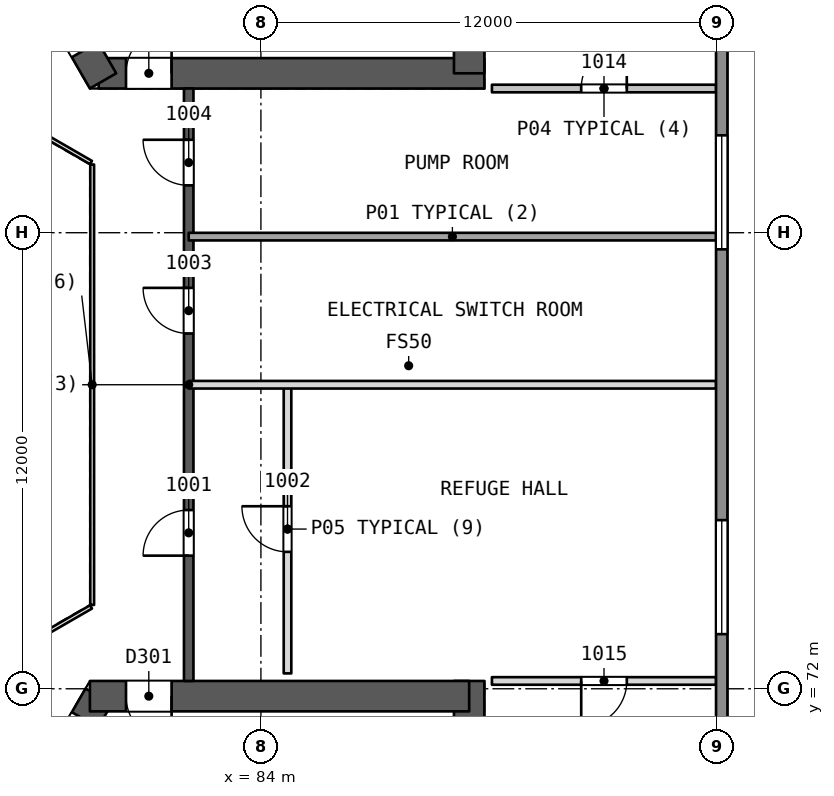
"""IFC4 building model, lengths in metres.
Left out: names, types, materials, properties, quantities, classifications, styles, units other than length and angle.
Written with IfcOpenShell. Run it as: python <this file> out.ifc"""

import sys

from ifc_helpers import new_model, si_unit, direction, frame, frame_2d, origin, place, context, subcontext, project, spatial, rectangle, extrude, element, fill, save


model = new_model("IFC4")
c1 = context("Model", 3, precision=1e-05, world=origin(), true_north=direction((0.0, 1.0)))
c2 = subcontext(c1, "Body", "Model", "MODEL_VIEW")
j1 = project(units=[si_unit("LENGTHUNIT", "METRE"), si_unit("PLANEANGLEUNIT", "RADIAN")], contexts=[c1])
p1 = place(None, origin())
s1 = spatial("IfcSite", under=j1, at=p1, CompositionType="ELEMENT")
p2 = place(p1, origin())
s2 = spatial("IfcBuilding", under=s1, at=p2, CompositionType="ELEMENT")
p3 = place(p2, frame((0.0, 0.0, 48.5)))
s3 = spatial("IfcBuildingStorey", under=s2, at=p3, CompositionType="ELEMENT", Elevation=48.5)
p4 = place(p3, frame((79.731, 88.194, 0.0), z_axis=(0.0, 0.0, 1.0), x_axis=(1.0, 0.0, 0.0)))
e1 = element("IfcWall", 1, at=p4, inside=s3, PredefinedType="SHEAR", context=c2, shape_type="SweptSolid", body=[
    extrude(rectangle(XDim=10.149, YDim=0.8, at=frame_2d((5.074, 0.0))), origin(), (0.0, 0.0, 1.0), 4.4),
])
p5 = place(p4, frame((0.719, 0.0, 0.0)))
e2 = element("IfcOpeningElement", 2, at=p5, cuts=e1, PredefinedType="OPENING", context=c2, shape_type="SweptSolid", body=[
    extrude(rectangle(XDim=1.2, YDim=2.1, at=frame_2d((0.6, 1.05))), frame((0.0, 0.411, 0.0), z_axis=(0.0, -1.0, 0.0), x_axis=(1.0, 0.0, 0.0)), (0.0, 0.0, 1.0), 0.821),
])
p6 = place(p3, frame((89.48, 88.194, 0.0), z_axis=(0.0, 0.0, 1.0), x_axis=(0.0, 1.0, 0.0)))
e3 = element("IfcWall", 3, at=p6, inside=s3, PredefinedType="SHEAR", context=c2, shape_type="SweptSolid", body=[
    extrude(rectangle(XDim=13.933, YDim=0.8, at=frame_2d((6.967, 0.0))), origin(), (0.0, 0.0, 1.0), 4.4),
])
p7 = place(p3, frame((74.856, 96.637, 0.0), z_axis=(0.0, 0.0, 1.0), x_axis=(0.499993500917, -0.866029155999, 0.0)))
e4 = element("IfcWall", 4, at=p7, inside=s3, PredefinedType="SHEAR", context=c2, shape_type="SweptSolid", body=[
    extrude(rectangle(XDim=9.98, YDim=0.8, at=frame_2d((4.99, 0.0))), origin(), (0.0, 0.0, 1.0), 4.4),
])
p8 = place(p7, frame((7.83, 0.0, 0.0)))
e5 = element("IfcOpeningElement", 5, at=p8, cuts=e4, PredefinedType="OPENING", context=c2, shape_type="SweptSolid", body=[
    extrude(rectangle(XDim=1.2, YDim=2.1, at=frame_2d((0.6, 1.05))), frame((0.0, 0.411, 0.0), z_axis=(0.0, -1.0, 0.0), x_axis=(1.0, 0.0, 0.0)), (0.0, 0.0, 1.0), 0.821),
])
p9 = place(p3, frame((79.731, 71.806, 0.0), z_axis=(0.0, 0.0, 1.0), x_axis=(-0.49999662545, -0.866027352073, 0.0)))
e6 = element("IfcWall", 6, at=p9, inside=s3, PredefinedType="SHEAR", context=c2, shape_type="SweptSolid", body=[
    extrude(rectangle(XDim=10.149, YDim=0.8, at=frame_2d((5.074, 0.0))), origin(), (0.0, 0.0, 1.0), 4.4),
])
p10 = place(p9, frame((0.719, 0.0, 0.0)))
e7 = element("IfcOpeningElement", 7, at=p10, cuts=e6, PredefinedType="OPENING", context=c2, shape_type="SweptSolid", body=[
    extrude(rectangle(XDim=1.2, YDim=2.1, at=frame_2d((0.6, 1.05))), frame((0.0, 0.411, 0.0), z_axis=(0.0, -1.0, 0.0), x_axis=(1.0, 0.0, 0.0)), (0.0, 0.0, 1.0), 0.821),
])
p11 = place(p3, frame((89.48, 58.103, 0.0), z_axis=(0.0, 0.0, 1.0), x_axis=(0.0, 1.0, 0.0)))
e8 = element("IfcWall", 8, at=p11, inside=s3, PredefinedType="SHEAR", context=c2, shape_type="SweptSolid", body=[
    extrude(rectangle(XDim=14.103, YDim=0.8, at=frame_2d((7.051, 0.0))), origin(), (0.0, 0.0, 1.0), 4.4),
])
p12 = place(p3, frame((89.48, 71.806, 0.0), z_axis=(0.0, 0.0, 1.0), x_axis=(-1.0, 0.0, 0.0)))
e9 = element("IfcWall", 9, at=p12, inside=s3, PredefinedType="SHEAR", context=c2, shape_type="SweptSolid", body=[
    extrude(rectangle(XDim=9.98, YDim=0.8, at=frame_2d((4.99, 0.0))), origin(), (0.0, 0.0, 1.0), 4.4),
])
p13 = place(p12, frame((7.83, 0.0, 0.0)))
e10 = element("IfcOpeningElement", 10, at=p13, cuts=e9, PredefinedType="OPENING", context=c2, shape_type="SweptSolid", body=[
    extrude(rectangle(XDim=1.2, YDim=2.1, at=frame_2d((0.6, 1.05))), frame((0.0, 0.411, 0.0), z_axis=(0.0, -1.0, 0.0), x_axis=(1.0, 0.0, 0.0)), (0.0, 0.0, 1.0), 0.821),
])
p14 = place(p3, frame((82.1, 72.206, 0.0), z_axis=(0.0, 0.0, 1.0), x_axis=(0.0, 1.0, 0.0)))
e11 = element("IfcWall", 11, at=p14, inside=s3, PredefinedType="SHEAR", context=c2, shape_type="SweptSolid", body=[
    extrude(rectangle(XDim=15.588, YDim=0.25, at=frame_2d((7.794, 0.0))), origin(), (0.0, 0.0, 1.0), 3.9),
])
p15 = place(p14, frame((3.297, 0.0, 0.0)))
e12 = element("IfcOpeningElement", 12, at=p15, cuts=e11, PredefinedType="OPENING", context=c2, shape_type="SweptSolid", body=[
    extrude(rectangle(XDim=1.2, YDim=2.4, at=frame_2d((0.6, 1.2))), frame((0.0, 0.135, 0.0), z_axis=(0.0, -1.0, 0.0), x_axis=(1.0, 0.0, 0.0)), (0.0, 0.0, 1.0), 0.271),
])
p16 = place(p14, frame((9.143, 0.0, 0.0)))
e13 = element("IfcOpeningElement", 13, at=p16, cuts=e11, PredefinedType="OPENING", context=c2, shape_type="SweptSolid", body=[
    extrude(rectangle(XDim=1.2, YDim=2.4, at=frame_2d((0.6, 1.2))), frame((0.0, 0.135, 0.0), z_axis=(0.0, -1.0, 0.0), x_axis=(1.0, 0.0, 0.0)), (0.0, 0.0, 1.0), 0.271),
])
p17 = place(p14, frame((13.04, 0.0, 0.0)))
e14 = element("IfcOpeningElement", 14, at=p17, cuts=e11, PredefinedType="OPENING", context=c2, shape_type="SweptSolid", body=[
    extrude(rectangle(XDim=1.2, YDim=2.4, at=frame_2d((0.6, 1.2))), frame((0.0, 0.135, 0.0), z_axis=(0.0, -1.0, 0.0), x_axis=(1.0, 0.0, 0.0)), (0.0, 0.0, 1.0), 0.271),
])
p18 = place(p3, frame((84.7, 72.405, 0.0), z_axis=(0.0, 0.0, 1.0), x_axis=(0.0, 1.0, 0.0)))
e15 = element("IfcWall", 15, at=p18, inside=s3, PredefinedType="PARTITIONING", context=c2, shape_type="SweptSolid", body=[
    extrude(rectangle(XDim=7.595, YDim=0.2, at=frame_2d((3.798, 0.0))), origin(), (0.0, 0.0, 1.0), 3.9),
])
p19 = place(p18, frame((3.198, 0.0, 0.0)))
e16 = element("IfcOpeningElement", 16, at=p19, cuts=e15, PredefinedType="OPENING", context=c2, shape_type="SweptSolid", body=[
    extrude(rectangle(XDim=1.2, YDim=2.4, at=frame_2d((0.6, 1.2))), frame((0.0, 0.11, 0.0), z_axis=(0.0, -1.0, 0.0), x_axis=(1.0, 0.0, 0.0)), (0.0, 0.0, 1.0), 0.221),
])
p20 = place(p3, frame((95.978, 80.0, 0.0), z_axis=(0.0, 0.0, 1.0), x_axis=(-1.0, 0.0, 0.0)))
e17 = element("IfcWall", 17, at=p20, inside=s3, PredefinedType="PARTITIONING", context=c2, shape_type="SweptSolid", body=[
    extrude(rectangle(XDim=13.877, YDim=0.2, at=frame_2d((6.939, 0.0))), origin(), (0.0, 0.0, 1.0), 3.9),
])
p21 = place(p3, frame((95.978, 72.206, 0.0), z_axis=(0.0, 0.0, 1.0), x_axis=(-1.0, 0.0, 0.0)))
e18 = element("IfcWall", 18, at=p21, inside=s3, PredefinedType="PARTITIONING", context=c2, shape_type="SweptSolid", body=[
    extrude(rectangle(XDim=5.898, YDim=0.2, at=frame_2d((2.949, 0.0))), origin(), (0.0, 0.0, 1.0), 3.9),
])
p22 = place(p21, frame((2.349, 0.0, 0.0)))
e19 = element("IfcOpeningElement", 19, at=p22, cuts=e18, PredefinedType="OPENING", context=c2, shape_type="SweptSolid", body=[
    extrude(rectangle(XDim=1.2, YDim=2.4, at=frame_2d((0.6, 1.2))), frame((0.0, 0.11, 0.0), z_axis=(0.0, -1.0, 0.0), x_axis=(1.0, 0.0, 0.0)), (0.0, 0.0, 1.0), 0.221),
])
p23 = place(p3, frame((95.978, 83.897, 0.0), z_axis=(0.0, 0.0, 1.0), x_axis=(-1.0, 0.0, 0.0)))
e20 = element("IfcWall", 20, at=p23, inside=s3, PredefinedType="PARTITIONING", context=c2, shape_type="SweptSolid", body=[
    extrude(rectangle(XDim=13.877, YDim=0.2, at=frame_2d((6.939, 0.0))), origin(), (0.0, 0.0, 1.0), 3.9),
])
p24 = place(p3, frame((90.079, 87.794, 0.0), z_axis=(0.0, 0.0, 1.0), x_axis=(1.0, 0.0, 0.0)))
e21 = element("IfcWall", 21, at=p24, inside=s3, PredefinedType="PARTITIONING", context=c2, shape_type="SweptSolid", body=[
    extrude(rectangle(XDim=5.898, YDim=0.2, at=frame_2d((2.949, 0.0))), origin(), (0.0, 0.0, 1.0), 3.9),
])
p25 = place(p24, frame((2.349, 0.0, 0.0)))
e22 = element("IfcOpeningElement", 22, at=p25, cuts=e21, PredefinedType="OPENING", context=c2, shape_type="SweptSolid", body=[
    extrude(rectangle(XDim=1.2, YDim=2.4, at=frame_2d((0.6, 1.2))), frame((0.0, 0.11, 0.0), z_axis=(0.0, -1.0, 0.0), x_axis=(1.0, 0.0, 0.0)), (0.0, 0.0, 1.0), 0.221),
])
p26 = place(p3, frame((96.126, 110.375, 0.0), z_axis=(0.0, 0.0, 1.0), x_axis=(0.0, -1.0, 0.0)))
e23 = element("IfcWall", 23, at=p26, inside=s3, PredefinedType="SOLIDWALL", context=c2, shape_type="SweptSolid", body=[
    extrude(rectangle(XDim=60.751, YDim=0.3, at=frame_2d((30.375, 0.0))), origin(), (0.0, 0.0, 1.0), 3.9),
])
p27 = place(p26, frame((3.562, 0.0, 0.6)))
e24 = element("IfcOpeningElement", 24, at=p27, cuts=e23, PredefinedType="OPENING", context=c2, shape_type="SweptSolid", body=[
    extrude(rectangle(XDim=3.0, YDim=2.4, at=frame_2d((1.5, 1.2))), frame((0.0, 0.161, 0.0), z_axis=(0.0, -1.0, 0.0), x_axis=(1.0, 0.0, 0.0)), (0.0, 0.0, 1.0), 0.321),
])
p28 = place(p26, frame((13.688, 0.0, 0.6)))
e25 = element("IfcOpeningElement", 25, at=p28, cuts=e23, PredefinedType="OPENING", context=c2, shape_type="SweptSolid", body=[
    extrude(rectangle(XDim=3.0, YDim=2.4, at=frame_2d((1.5, 1.2))), frame((0.0, 0.161, 0.0), z_axis=(0.0, -1.0, 0.0), x_axis=(1.0, 0.0, 0.0)), (0.0, 0.0, 1.0), 0.321),
])
p29 = place(p26, frame((23.813, 0.0, 0.6)))
e26 = element("IfcOpeningElement", 26, at=p29, cuts=e23, PredefinedType="OPENING", context=c2, shape_type="SweptSolid", body=[
    extrude(rectangle(XDim=3.0, YDim=2.4, at=frame_2d((1.5, 1.2))), frame((0.0, 0.161, 0.0), z_axis=(0.0, -1.0, 0.0), x_axis=(1.0, 0.0, 0.0)), (0.0, 0.0, 1.0), 0.321),
])
p30 = place(p26, frame((33.938, 0.0, 0.6)))
e27 = element("IfcOpeningElement", 27, at=p30, cuts=e23, PredefinedType="OPENING", context=c2, shape_type="SweptSolid", body=[
    extrude(rectangle(XDim=3.0, YDim=2.4, at=frame_2d((1.5, 1.2))), frame((0.0, 0.161, 0.0), z_axis=(0.0, -1.0, 0.0), x_axis=(1.0, 0.0, 0.0)), (0.0, 0.0, 1.0), 0.321),
])
p31 = place(p26, frame((44.063, 0.0, 0.6)))
e28 = element("IfcOpeningElement", 28, at=p31, cuts=e23, PredefinedType="OPENING", context=c2, shape_type="SweptSolid", body=[
    extrude(rectangle(XDim=3.0, YDim=2.4, at=frame_2d((1.5, 1.2))), frame((0.0, 0.161, 0.0), z_axis=(0.0, -1.0, 0.0), x_axis=(1.0, 0.0, 0.0)), (0.0, 0.0, 1.0), 0.321),
])
p32 = place(p26, frame((54.188, 0.0, 0.6)))
e29 = element("IfcOpeningElement", 29, at=p32, cuts=e23, PredefinedType="OPENING", context=c2, shape_type="SweptSolid", body=[
    extrude(rectangle(XDim=3.0, YDim=2.4, at=frame_2d((1.5, 1.2))), frame((0.0, 0.161, 0.0), z_axis=(0.0, -1.0, 0.0), x_axis=(1.0, 0.0, 0.0)), (0.0, 0.0, 1.0), 0.321),
])
p33 = place(p3, frame((38.131, 83.108, 0.0), z_axis=(0.0, 0.0, 1.0), x_axis=(0.866025105017, 0.50000051748, 0.0)))
e30 = element("IfcWall", 30, at=p33, inside=s3, PredefinedType="SOLIDWALL", context=c2, shape_type="SweptSolid", body=[
    extrude(rectangle(XDim=60.751, YDim=0.3, at=frame_2d((30.375, 0.0))), origin(), (0.0, 0.0, 1.0), 3.9),
])
p34 = place(p33, frame((3.562, 0.0, 0.6)))
e31 = element("IfcOpeningElement", 31, at=p34, cuts=e30, PredefinedType="OPENING", context=c2, shape_type="SweptSolid", body=[
    extrude(rectangle(XDim=3.0, YDim=2.4, at=frame_2d((1.5, 1.2))), frame((0.0, 0.161, 0.0), z_axis=(0.0, -1.0, 0.0), x_axis=(1.0, 0.0, 0.0)), (0.0, 0.0, 1.0), 0.321),
])
p35 = place(p33, frame((13.688, 0.0, 0.6)))
e32 = element("IfcOpeningElement", 32, at=p35, cuts=e30, PredefinedType="OPENING", context=c2, shape_type="SweptSolid", body=[
    extrude(rectangle(XDim=3.0, YDim=2.4, at=frame_2d((1.5, 1.2))), frame((0.0, 0.161, 0.0), z_axis=(0.0, -1.0, 0.0), x_axis=(1.0, 0.0, 0.0)), (0.0, 0.0, 1.0), 0.321),
])
p36 = place(p33, frame((23.813, 0.0, 0.6)))
e33 = element("IfcOpeningElement", 33, at=p36, cuts=e30, PredefinedType="OPENING", context=c2, shape_type="SweptSolid", body=[
    extrude(rectangle(XDim=3.0, YDim=2.4, at=frame_2d((1.5, 1.2))), frame((0.0, 0.161, 0.0), z_axis=(0.0, -1.0, 0.0), x_axis=(1.0, 0.0, 0.0)), (0.0, 0.0, 1.0), 0.321),
])
p37 = place(p33, frame((33.938, 0.0, 0.6)))
e34 = element("IfcOpeningElement", 34, at=p37, cuts=e30, PredefinedType="OPENING", context=c2, shape_type="SweptSolid", body=[
    extrude(rectangle(XDim=3.0, YDim=2.4, at=frame_2d((1.5, 1.2))), frame((0.0, 0.161, 0.0), z_axis=(0.0, -1.0, 0.0), x_axis=(1.0, 0.0, 0.0)), (0.0, 0.0, 1.0), 0.321),
])
p38 = place(p33, frame((44.063, 0.0, 0.6)))
e35 = element("IfcOpeningElement", 35, at=p38, cuts=e30, PredefinedType="OPENING", context=c2, shape_type="SweptSolid", body=[
    extrude(rectangle(XDim=3.0, YDim=2.4, at=frame_2d((1.5, 1.2))), frame((0.0, 0.161, 0.0), z_axis=(0.0, -1.0, 0.0), x_axis=(1.0, 0.0, 0.0)), (0.0, 0.0, 1.0), 0.321),
])
p39 = place(p33, frame((54.188, 0.0, 0.6)))
e36 = element("IfcOpeningElement", 36, at=p39, cuts=e30, PredefinedType="OPENING", context=c2, shape_type="SweptSolid", body=[
    extrude(rectangle(XDim=3.0, YDim=2.4, at=frame_2d((1.5, 1.2))), frame((0.0, 0.161, 0.0), z_axis=(0.0, -1.0, 0.0), x_axis=(1.0, 0.0, 0.0)), (0.0, 0.0, 1.0), 0.321),
])
p40 = place(p3, frame((90.743, 46.516, 0.0), z_axis=(0.0, 0.0, 1.0), x_axis=(-0.866025105017, 0.50000051748, 0.0)))
e37 = element("IfcWall", 37, at=p40, inside=s3, PredefinedType="SOLIDWALL", context=c2, shape_type="SweptSolid", body=[
    extrude(rectangle(XDim=60.751, YDim=0.3, at=frame_2d((30.375, 0.0))), origin(), (0.0, 0.0, 1.0), 3.9),
])
p41 = place(p40, frame((3.562, 0.0, 0.6)))
e38 = element("IfcOpeningElement", 38, at=p41, cuts=e37, PredefinedType="OPENING", context=c2, shape_type="SweptSolid", body=[
    extrude(rectangle(XDim=3.0, YDim=2.4, at=frame_2d((1.5, 1.2))), frame((0.0, 0.161, 0.0), z_axis=(0.0, -1.0, 0.0), x_axis=(1.0, 0.0, 0.0)), (0.0, 0.0, 1.0), 0.321),
])
p42 = place(p40, frame((13.688, 0.0, 0.6)))
e39 = element("IfcOpeningElement", 39, at=p42, cuts=e37, PredefinedType="OPENING", context=c2, shape_type="SweptSolid", body=[
    extrude(rectangle(XDim=3.0, YDim=2.4, at=frame_2d((1.5, 1.2))), frame((0.0, 0.161, 0.0), z_axis=(0.0, -1.0, 0.0), x_axis=(1.0, 0.0, 0.0)), (0.0, 0.0, 1.0), 0.321),
])
p43 = place(p40, frame((23.813, 0.0, 0.6)))
e40 = element("IfcOpeningElement", 40, at=p43, cuts=e37, PredefinedType="OPENING", context=c2, shape_type="SweptSolid", body=[
    extrude(rectangle(XDim=3.0, YDim=2.4, at=frame_2d((1.5, 1.2))), frame((0.0, 0.161, 0.0), z_axis=(0.0, -1.0, 0.0), x_axis=(1.0, 0.0, 0.0)), (0.0, 0.0, 1.0), 0.321),
])
p44 = place(p40, frame((33.938, 0.0, 0.6)))
e41 = element("IfcOpeningElement", 41, at=p44, cuts=e37, PredefinedType="OPENING", context=c2, shape_type="SweptSolid", body=[
    extrude(rectangle(XDim=3.0, YDim=2.4, at=frame_2d((1.5, 1.2))), frame((0.0, 0.161, 0.0), z_axis=(0.0, -1.0, 0.0), x_axis=(1.0, 0.0, 0.0)), (0.0, 0.0, 1.0), 0.321),
])
p45 = place(p40, frame((44.063, 0.0, 0.6)))
e42 = element("IfcOpeningElement", 42, at=p45, cuts=e37, PredefinedType="OPENING", context=c2, shape_type="SweptSolid", body=[
    extrude(rectangle(XDim=3.0, YDim=2.4, at=frame_2d((1.5, 1.2))), frame((0.0, 0.161, 0.0), z_axis=(0.0, -1.0, 0.0), x_axis=(1.0, 0.0, 0.0)), (0.0, 0.0, 1.0), 0.321),
])
p46 = place(p40, frame((54.188, 0.0, 0.6)))
e43 = element("IfcOpeningElement", 43, at=p46, cuts=e37, PredefinedType="OPENING", context=c2, shape_type="SweptSolid", body=[
    extrude(rectangle(XDim=3.0, YDim=2.4, at=frame_2d((1.5, 1.2))), frame((0.0, 0.161, 0.0), z_axis=(0.0, -1.0, 0.0), x_axis=(1.0, 0.0, 0.0)), (0.0, 0.0, 1.0), 0.321),
])
p47 = place(p3, frame((79.56, 74.206, 0.0), z_axis=(0.0, 0.0, 1.0), x_axis=(0.0, 1.0, 0.0)))
e44 = element("IfcWall", 44, at=p47, inside=s3, PredefinedType="PARTITIONING", context=c2, shape_type="SweptSolid", body=[
    extrude(rectangle(XDim=11.588, YDim=0.1, at=frame_2d((5.794, 0.0))), origin(), (0.0, 0.0, 1.0), 3.9),
])
for number, where, z_axis, x_axis in (
    (45, (79.53, 85.846, 0.0), (0.0, 0.0, 1.0), (-0.866, 0.5, 0.0)),
    (46, (77.798, 73.154, 0.0), (0.0, 0.0, 1.0), (0.866, 0.5, 0.0)),
):
    element("IfcWall", number, at=place(p3, frame(where, z_axis=z_axis, x_axis=x_axis)), inside=s3, PredefinedType="PARTITIONING", context=c2, shape_type="SweptSolid", body=[
        extrude(rectangle(XDim=2.0, YDim=0.1, at=frame_2d((1.0, 0.0))), origin(), (0.0, 0.0, 1.0), 3.9),
    ])
p48 = place(p15, origin())
e47 = element("IfcDoor", 47, at=p48, inside=s3, OperationType="SINGLE_SWING_LEFT", PredefinedType="NOTDEFINED", context=c2, shape_type="SweptSolid", body=[
    extrude(rectangle(XDim=1.2, YDim=2.4, at=frame_2d((0.6, 1.2))), frame((0.0, 0.025, 0.0), z_axis=(0.0, -1.0, 0.0), x_axis=(1.0, 0.0, 0.0)), (0.0, 0.0, 1.0), 0.05),
])
fill(e12, e47)
p49 = place(p19, origin())
e48 = element("IfcDoor", 48, at=p49, inside=s3, OperationType="SINGLE_SWING_RIGHT", PredefinedType="NOTDEFINED", context=c2, shape_type="SweptSolid", body=[
    extrude(rectangle(XDim=1.2, YDim=2.4, at=frame_2d((0.6, 1.2))), frame((0.0, 0.025, 0.0), z_axis=(0.0, -1.0, 0.0), x_axis=(1.0, 0.0, 0.0)), (0.0, 0.0, 1.0), 0.05),
])
fill(e16, e48)
p50 = place(p16, origin())
e49 = element("IfcDoor", 49, at=p50, inside=s3, OperationType="SINGLE_SWING_RIGHT", PredefinedType="NOTDEFINED", context=c2, shape_type="SweptSolid", body=[
    extrude(rectangle(XDim=1.2, YDim=2.4, at=frame_2d((0.6, 1.2))), frame((0.0, 0.025, 0.0), z_axis=(0.0, -1.0, 0.0), x_axis=(1.0, 0.0, 0.0)), (0.0, 0.0, 1.0), 0.05),
])
fill(e13, e49)
p51 = place(p17, origin())
e50 = element("IfcDoor", 50, at=p51, inside=s3, OperationType="SINGLE_SWING_RIGHT", PredefinedType="NOTDEFINED", context=c2, shape_type="SweptSolid", body=[
    extrude(rectangle(XDim=1.2, YDim=2.4, at=frame_2d((0.6, 1.2))), frame((0.0, 0.025, 0.0), z_axis=(0.0, -1.0, 0.0), x_axis=(1.0, 0.0, 0.0)), (0.0, 0.0, 1.0), 0.05),
])
fill(e14, e50)
p52 = place(p25, origin())
e51 = element("IfcDoor", 51, at=p52, inside=s3, OperationType="SINGLE_SWING_RIGHT", PredefinedType="NOTDEFINED", context=c2, shape_type="SweptSolid", body=[
    extrude(rectangle(XDim=1.2, YDim=2.4, at=frame_2d((0.6, 1.2))), frame((0.0, 0.025, 0.0), z_axis=(0.0, -1.0, 0.0), x_axis=(1.0, 0.0, 0.0)), (0.0, 0.0, 1.0), 0.05),
])
fill(e22, e51)
p53 = place(p22, origin())
e52 = element("IfcDoor", 52, at=p53, inside=s3, OperationType="SINGLE_SWING_RIGHT", PredefinedType="NOTDEFINED", context=c2, shape_type="SweptSolid", body=[
    extrude(rectangle(XDim=1.2, YDim=2.4, at=frame_2d((0.6, 1.2))), frame((0.0, 0.025, 0.0), z_axis=(0.0, -1.0, 0.0), x_axis=(1.0, 0.0, 0.0)), (0.0, 0.0, 1.0), 0.05),
])
fill(e19, e52)
p54 = place(p29, origin())
e53 = element("IfcWindow", 53, at=p54, inside=s3, PartitioningType="SINGLE_PANEL", PredefinedType="WINDOW", context=c2, shape_type="SweptSolid", body=[
    extrude(rectangle(XDim=3.0, YDim=2.4, at=frame_2d((1.5, 1.2))), frame((0.0, 0.03, 0.0), z_axis=(0.0, -1.0, 0.0), x_axis=(1.0, 0.0, 0.0)), (0.0, 0.0, 1.0), 0.06),
])
fill(e26, e53)
p55 = place(p30, origin())
e54 = element("IfcWindow", 54, at=p55, inside=s3, PartitioningType="SINGLE_PANEL", PredefinedType="WINDOW", context=c2, shape_type="SweptSolid", body=[
    extrude(rectangle(XDim=3.0, YDim=2.4, at=frame_2d((1.5, 1.2))), frame((0.0, 0.03, 0.0), z_axis=(0.0, -1.0, 0.0), x_axis=(1.0, 0.0, 0.0)), (0.0, 0.0, 1.0), 0.06),
])
fill(e27, e54)
p56 = place(p5, origin())
e55 = element("IfcDoor", 55, at=p56, inside=s3, OperationType="SINGLE_SWING_RIGHT", PredefinedType="NOTDEFINED", context=c2, shape_type="SweptSolid", body=[
    extrude(rectangle(XDim=1.2, YDim=2.1, at=frame_2d((0.6, 1.05))), frame((0.0, 0.025, 0.0), z_axis=(0.0, -1.0, 0.0), x_axis=(1.0, 0.0, 0.0)), (0.0, 0.0, 1.0), 0.05),
])
fill(e2, e55)
p57 = place(p13, origin())
e56 = element("IfcDoor", 56, at=p57, inside=s3, OperationType="SINGLE_SWING_LEFT", PredefinedType="NOTDEFINED", context=c2, shape_type="SweptSolid", body=[
    extrude(rectangle(XDim=1.2, YDim=2.1, at=frame_2d((0.6, 1.05))), frame((0.0, 0.025, 0.0), z_axis=(0.0, -1.0, 0.0), x_axis=(1.0, 0.0, 0.0)), (0.0, 0.0, 1.0), 0.05),
])
fill(e10, e56)
save(model, sys.argv[1])
